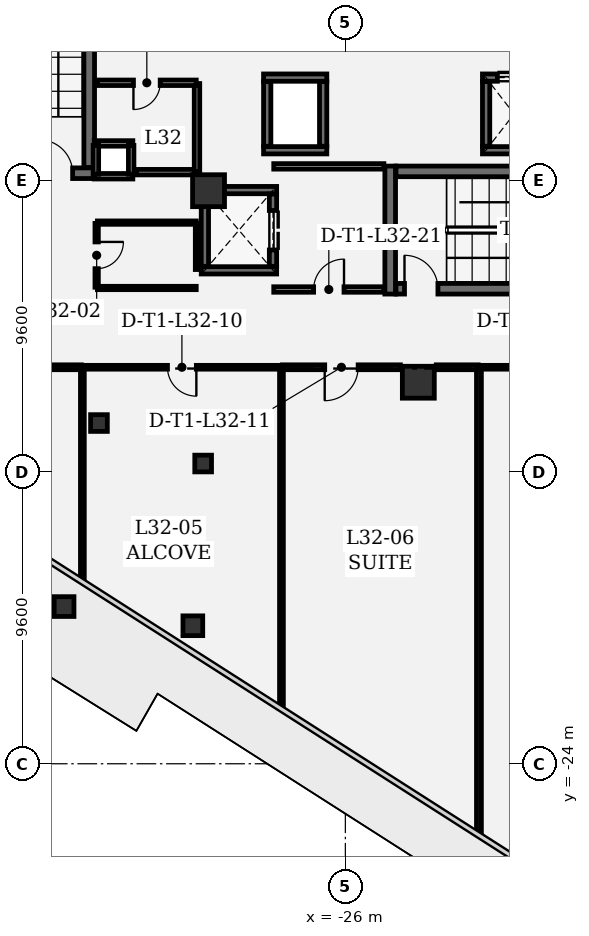
"""IFC4 building model, lengths in metres.
Left out: names, types, materials, properties, quantities, classifications, styles, units other than length and angle.
Written with IfcOpenShell. Run it as: python <this file> out.ifc"""

import sys

from ifc_helpers import new_model, si_unit, direction, frame, frame_2d, origin, origin_2d, place, context, subcontext, project, spatial, rectangle, extrude, element, fill, save


model = new_model("IFC4")
c1 = context("Model", 3, precision=1e-05, world=origin(), true_north=direction((0.0, 1.0)))
c2 = subcontext(c1, "Body", "Model", "MODEL_VIEW")
j1 = project(units=[si_unit("LENGTHUNIT", "METRE"), si_unit("PLANEANGLEUNIT", "RADIAN")], contexts=[c1])
p1 = place(None, origin())
s1 = spatial("IfcSite", under=j1, at=p1, CompositionType="ELEMENT")
p2 = place(p1, origin())
s2 = spatial("IfcBuilding", under=s1, at=p2, CompositionType="ELEMENT")
p3 = place(p2, frame((0.0, 0.0, 142.2)))
s3 = spatial("IfcBuildingStorey", under=s2, at=p3, CompositionType="ELEMENT", Elevation=142.2)
for number, where, z_axis, x_axis in (
    (1, (-23.6, -11.45, 0.0), (0.0, 0.0, 1.0), (1.0, 0.0, 0.0)),
    (2, (-30.5, -5.15, 0.0), (0.0, 0.0, 1.0), (1.0, 0.0, 0.0)),
):
    element("IfcColumn", number, at=place(p3, frame(where, z_axis=z_axis, x_axis=x_axis)), inside=s3, PredefinedType="COLUMN", context=c2, shape_type="SweptSolid", body=[
        extrude(rectangle(XDim=1.05, YDim=1.05, at=origin_2d()), origin(), (0.0, 0.0, 1.0), 4.05),
    ])
for number, where, z_axis, x_axis in (
    (3, (-35.252, -18.829, 0.0), (0.0, 0.0, 1.0), (1.0, 0.0, 0.0)),
    (4, (-31.016, -19.46, 0.0), (0.0, 0.0, 1.0), (1.0, 0.0, 0.0)),
):
    element("IfcColumn", number, at=place(p3, frame(where, z_axis=z_axis, x_axis=x_axis)), inside=s3, PredefinedType="COLUMN", context=c2, shape_type="SweptSolid", body=[
        extrude(rectangle(XDim=0.65, YDim=0.65, at=origin_2d()), origin(), (0.0, 0.0, 1.0), 4.05),
    ])
for number, where, z_axis, x_axis in (
    (5, (-34.104, -12.792, 0.0), (0.0, 0.0, 1.0), (1.0, 0.0, 0.0)),
    (6, (-30.677, -14.124, 0.0), (0.0, 0.0, 1.0), (1.0, 0.0, 0.0)),
):
    element("IfcColumn", number, at=place(p3, frame(where, z_axis=z_axis, x_axis=x_axis)), inside=s3, PredefinedType="COLUMN", context=c2, shape_type="SweptSolid", body=[
        extrude(rectangle(XDim=0.55, YDim=0.55, at=origin_2d()), origin(), (0.0, 0.0, 1.0), 4.05),
    ])
p4 = place(p3, frame((-24.525, -4.34, 0.0), z_axis=(0.0, 0.0, 1.0), x_axis=(0.0, -1.0, 0.0)))
e7 = element("IfcWall", 7, at=p4, inside=s3, PredefinedType="SHEAR", context=c2, shape_type="SweptSolid", body=[
    extrude(rectangle(XDim=4.21, YDim=0.35, at=frame_2d((2.105, 0.0))), origin(), (0.0, 0.0, 1.0), 3.78),
])
p5 = place(p3, frame((-24.335, -8.375, 0.0), z_axis=(0.0, 0.0, 1.0), x_axis=(1.0, 0.0, 0.0)))
e8 = element("IfcWall", 8, at=p5, inside=s3, PredefinedType="SHEAR", context=c2, shape_type="SweptSolid", body=[
    extrude(rectangle(XDim=8.12, YDim=0.35, at=frame_2d((4.06, 0.0))), origin(), (0.0, 0.0, 1.0), 3.78),
])
p6 = place(p5, frame((0.28, 0.0, 0.0)))
e9 = element("IfcOpeningElement", 9, at=p6, cuts=e8, PredefinedType="OPENING", context=c2, shape_type="SweptSolid", body=[
    extrude(rectangle(XDim=1.1, YDim=2.2, at=frame_2d((0.55, 1.1))), frame((0.0, 0.185, 0.0), z_axis=(0.0, -1.0, 0.0), x_axis=(1.0, 0.0, 0.0)), (0.0, 0.0, 1.0), 0.37),
])
p7 = place(p3, frame((-16.215, -4.515, 0.0), z_axis=(0.0, 0.0, 1.0), x_axis=(-1.0, 0.0, 0.0)))
e10 = element("IfcWall", 10, at=p7, inside=s3, PredefinedType="SHEAR", context=c2, shape_type="SweptSolid", body=[
    extrude(rectangle(XDim=8.12, YDim=0.35, at=frame_2d((4.06, 0.0))), origin(), (0.0, 0.0, 1.0), 3.78),
])
p8 = place(p3, frame((-38.46, -4.575, 0.0), z_axis=(0.0, 0.0, 1.0), x_axis=(1.0, 0.0, 0.0)))
e11 = element("IfcWall", 11, at=p8, inside=s3, PredefinedType="SHEAR", context=c2, shape_type="SweptSolid", body=[
    extrude(rectangle(XDim=4.21, YDim=0.35, at=frame_2d((2.105, 0.0))), origin(), (0.0, 0.0, 1.0), 3.78),
])
p9 = place(p8, frame((2.39, 0.0, 0.0)))
e12 = element("IfcOpeningElement", 12, at=p9, cuts=e11, PredefinedType="OPENING", context=c2, shape_type="SweptSolid", body=[
    extrude(rectangle(XDim=1.1, YDim=2.2, at=frame_2d((0.55, 1.1))), frame((0.0, 0.185, 0.0), z_axis=(0.0, -1.0, 0.0), x_axis=(1.0, 0.0, 0.0)), (0.0, 0.0, 1.0), 0.37),
])
p10 = place(p3, frame((-34.425, -4.385, 0.0), z_axis=(0.0, 0.0, 1.0), x_axis=(0.0, 1.0, 0.0)))
e13 = element("IfcWall", 13, at=p10, inside=s3, PredefinedType="SHEAR", context=c2, shape_type="SweptSolid", body=[
    extrude(rectangle(XDim=8.77, YDim=0.35, at=frame_2d((4.385, 0.0))), origin(), (0.0, 0.0, 1.0), 3.78),
])
for number, where, z_axis, x_axis in (
    (14, (-28.26, -7.77, 0.0), (0.0, 0.0, 1.0), (-1.0, 0.0, 0.0)),
    (15, (-30.74, -5.13, 0.0), (0.0, 0.0, 1.0), (1.0, 0.0, 0.0)),
):
    element("IfcWall", number, at=place(p3, frame(where, z_axis=z_axis, x_axis=x_axis)), inside=s3, PredefinedType="SHEAR", context=c2, shape_type="SweptSolid", body=[
        extrude(rectangle(XDim=2.48, YDim=0.24, at=frame_2d((1.24, 0.0))), origin(), (0.0, 0.0, 1.0), 3.78),
    ])
p11 = place(p3, frame((-30.62, -7.638, 0.0), z_axis=(0.0, 0.0, 1.0), x_axis=(0.0, 1.0, 0.0)))
e16 = element("IfcWall", 16, at=p11, inside=s3, PredefinedType="SHEAR", context=c2, shape_type="SweptSolid", body=[
    extrude(rectangle(XDim=2.376, YDim=0.24, at=frame_2d((1.188, 0.0))), origin(), (0.0, 0.0, 1.0), 3.78),
])
p12 = place(p3, frame((-28.38, -5.262, 0.0), z_axis=(0.0, 0.0, 1.0), x_axis=(0.0, -1.0, 0.0)))
e17 = element("IfcWall", 17, at=p12, inside=s3, PredefinedType="SHEAR", context=c2, shape_type="SweptSolid", body=[
    extrude(rectangle(XDim=2.376, YDim=0.24, at=frame_2d((1.188, 0.0))), origin(), (0.0, 0.0, 1.0), 3.78),
])
p13 = place(p12, frame((0.538, 0.0, 0.0)))
e18 = element("IfcOpeningElement", 18, at=p13, cuts=e17, PredefinedType="OPENING", context=c2, shape_type="SweptSolid", body=[
    extrude(rectangle(XDim=1.3, YDim=2.3, at=frame_2d((0.65, 1.15))), frame((0.0, 0.13, 0.0), z_axis=(0.0, -1.0, 0.0), x_axis=(1.0, 0.0, 0.0)), (0.0, 0.0, 1.0), 0.26),
])
for number, where, z_axis, x_axis in (
    (19, (-26.61, -3.82, 0.0), (0.0, 0.0, 1.0), (-1.0, 0.0, 0.0)),
    (20, (-28.69, -1.43, 0.0), (0.0, 0.0, 1.0), (1.0, 0.0, 0.0)),
):
    element("IfcWall", number, at=place(p3, frame(where, z_axis=z_axis, x_axis=x_axis)), inside=s3, PredefinedType="SHEAR", context=c2, shape_type="SweptSolid", body=[
        extrude(rectangle(XDim=2.08, YDim=0.24, at=frame_2d((1.04, 0.0))), origin(), (0.0, 0.0, 1.0), 3.78),
    ])
for number, where, z_axis, x_axis in (
    (21, (-28.57, -3.688, 0.0), (0.0, 0.0, 1.0), (0.0, 1.0, 0.0)),
    (22, (-26.73, -1.562, 0.0), (0.0, 0.0, 1.0), (0.0, -1.0, 0.0)),
):
    element("IfcWall", number, at=place(p3, frame(where, z_axis=z_axis, x_axis=x_axis)), inside=s3, PredefinedType="SHEAR", context=c2, shape_type="SweptSolid", body=[
        extrude(rectangle(XDim=2.126, YDim=0.24, at=frame_2d((1.063, 0.0))), origin(), (0.0, 0.0, 1.0), 3.78),
    ])
p14 = place(p3, frame((-19.41, -3.82, 0.0), z_axis=(0.0, 0.0, 1.0), x_axis=(-1.0, 0.0, 0.0)))
e23 = element("IfcWall", 23, at=p14, inside=s3, PredefinedType="SHEAR", context=c2, shape_type="SweptSolid", body=[
    extrude(rectangle(XDim=2.08, YDim=0.24, at=frame_2d((1.04, 0.0))), origin(), (0.0, 0.0, 1.0), 3.78),
])
p15 = place(p3, frame((-21.49, -1.43, 0.0), z_axis=(0.0, 0.0, 1.0), x_axis=(1.0, 0.0, 0.0)))
e24 = element("IfcWall", 24, at=p15, inside=s3, PredefinedType="SHEAR", context=c2, shape_type="SweptSolid", body=[
    extrude(rectangle(XDim=2.08, YDim=0.24, at=frame_2d((1.04, 0.0))), origin(), (0.0, 0.0, 1.0), 3.78),
])
p16 = place(p15, frame((0.49, 0.0, 0.0)))
e25 = element("IfcOpeningElement", 25, at=p16, cuts=e24, PredefinedType="OPENING", context=c2, shape_type="SweptSolid", body=[
    extrude(rectangle(XDim=1.1, YDim=2.2, at=frame_2d((0.55, 1.1))), frame((0.0, 0.13, 0.0), z_axis=(0.0, -1.0, 0.0), x_axis=(1.0, 0.0, 0.0)), (0.0, 0.0, 1.0), 0.26),
])
p17 = place(p3, frame((-21.37, -3.688, 0.0), z_axis=(0.0, 0.0, 1.0), x_axis=(0.0, 1.0, 0.0)))
e26 = element("IfcWall", 26, at=p17, inside=s3, PredefinedType="SHEAR", context=c2, shape_type="SweptSolid", body=[
    extrude(rectangle(XDim=2.126, YDim=0.24, at=frame_2d((1.063, 0.0))), origin(), (0.0, 0.0, 1.0), 3.78),
])
for number, where, z_axis, x_axis in (
    (27, (-32.99, -4.675, 0.0), (0.0, 0.0, 1.0), (-1.0, 0.0, 0.0)),
    (28, (-34.26, -3.595, 0.0), (0.0, 0.0, 1.0), (1.0, 0.0, 0.0)),
):
    element("IfcWall", number, at=place(p3, frame(where, z_axis=z_axis, x_axis=x_axis)), inside=s3, PredefinedType="PARTITIONING", context=c2, shape_type="SweptSolid", body=[
        extrude(rectangle(XDim=1.27, YDim=0.18, at=frame_2d((0.635, 0.0))), origin(), (0.0, 0.0, 1.0), 3.78),
    ])
for number, where, z_axis, x_axis in (
    (29, (-34.205, -4.61, 0.0), (0.0, 0.0, 1.0), (0.0, 1.0, 0.0)),
    (30, (-33.045, -3.66, 0.0), (0.0, 0.0, 1.0), (0.0, -1.0, 0.0)),
):
    element("IfcWall", number, at=place(p3, frame(where, z_axis=z_axis, x_axis=x_axis)), inside=s3, PredefinedType="PARTITIONING", context=c2, shape_type="SweptSolid", body=[
        extrude(rectangle(XDim=0.95, YDim=0.18, at=frame_2d((0.475, 0.0))), origin(), (0.0, 0.0, 1.0), 3.78),
    ])
p18 = place(p3, frame((-28.355, -8.4, 0.0), z_axis=(0.0, 0.0, 1.0), x_axis=(1.0, 0.0, 0.0)))
e31 = element("IfcWall", 31, at=p18, inside=s3, PredefinedType="PARTITIONING", context=c2, shape_type="SweptSolid", body=[
    extrude(rectangle(XDim=3.622, YDim=0.18, at=frame_2d((1.811, 0.0))), origin(), (0.0, 0.0, 1.0), 3.78),
])
p19 = place(p18, frame((1.311, 0.0, 0.0)))
e32 = element("IfcOpeningElement", 32, at=p19, cuts=e31, PredefinedType="OPENING", context=c2, shape_type="SweptSolid", body=[
    extrude(rectangle(XDim=1.0, YDim=2.15, at=frame_2d((0.5, 1.075))), frame((0.0, 0.1, 0.0), z_axis=(0.0, -1.0, 0.0), x_axis=(1.0, 0.0, 0.0)), (0.0, 0.0, 1.0), 0.2),
])
p20 = place(p3, frame((-24.733, -4.35, 0.0), z_axis=(0.0, 0.0, 1.0), x_axis=(-1.0, 0.0, 0.0)))
e33 = element("IfcWall", 33, at=p20, inside=s3, PredefinedType="PARTITIONING", context=c2, shape_type="SweptSolid", body=[
    extrude(rectangle(XDim=3.622, YDim=0.18, at=frame_2d((1.811, 0.0))), origin(), (0.0, 0.0, 1.0), 3.78),
])
p21 = place(p3, frame((-34.18, -6.225, 0.0), z_axis=(0.0, 0.0, 1.0), x_axis=(0.0, -1.0, 0.0)))
e34 = element("IfcWall", 34, at=p21, inside=s3, PredefinedType="PARTITIONING", context=c2, shape_type="SweptSolid", body=[
    extrude(rectangle(XDim=2.1, YDim=0.11, at=frame_2d((1.05, 0.0))), origin(), (0.0, 0.0, 1.0), 3.78),
])
p22 = place(p21, frame((0.61, 0.0, 0.0)))
e35 = element("IfcOpeningElement", 35, at=p22, cuts=e34, PredefinedType="OPENING", context=c2, shape_type="SweptSolid", body=[
    extrude(rectangle(XDim=0.88, YDim=2.1, at=frame_2d((0.44, 1.05))), frame((0.0, 0.065, 0.0), z_axis=(0.0, -1.0, 0.0), x_axis=(1.0, 0.0, 0.0)), (0.0, 0.0, 1.0), 0.13),
])
p23 = place(p3, frame((-34.155, -8.35, 0.0), z_axis=(0.0, 0.0, 1.0), x_axis=(1.0, 0.0, 0.0)))
e36 = element("IfcWall", 36, at=p23, inside=s3, PredefinedType="PARTITIONING", context=c2, shape_type="SweptSolid", body=[
    extrude(rectangle(XDim=3.25, YDim=0.11, at=frame_2d((1.625, 0.0))), origin(), (0.0, 0.0, 1.0), 3.78),
])
p24 = place(p3, frame((-30.88, -7.743, 0.0), z_axis=(0.0, 0.0, 1.0), x_axis=(0.0, 1.0, 0.0)))
e37 = element("IfcWall", 37, at=p24, inside=s3, PredefinedType="PARTITIONING", context=c2, shape_type="SweptSolid", body=[
    extrude(rectangle(XDim=1.518, YDim=0.11, at=frame_2d((0.759, 0.0))), origin(), (0.0, 0.0, 1.0), 3.78),
])
p25 = place(p3, frame((-30.905, -6.2, 0.0), z_axis=(0.0, 0.0, 1.0), x_axis=(-1.0, 0.0, 0.0)))
e38 = element("IfcWall", 38, at=p25, inside=s3, PredefinedType="PARTITIONING", context=c2, shape_type="SweptSolid", body=[
    extrude(rectangle(XDim=3.25, YDim=0.11, at=frame_2d((1.625, 0.0))), origin(), (0.0, 0.0, 1.0), 3.344),
])
p26 = place(p3, frame((-32.88, -4.54, 0.0), z_axis=(0.0, 0.0, 1.0), x_axis=(1.0, 0.0, 0.0)))
e39 = element("IfcWall", 39, at=p26, inside=s3, PredefinedType="PARTITIONING", context=c2, shape_type="SweptSolid", body=[
    extrude(rectangle(XDim=1.975, YDim=0.18, at=frame_2d((0.988, 0.0))), origin(), (0.0, 0.0, 1.0), 3.78),
])
p27 = place(p3, frame((-30.88, -4.515, 0.0), z_axis=(0.0, 0.0, 1.0), x_axis=(0.0, 1.0, 0.0)))
e40 = element("IfcWall", 40, at=p27, inside=s3, PredefinedType="PARTITIONING", context=c2, shape_type="SweptSolid", body=[
    extrude(rectangle(XDim=2.89, YDim=0.18, at=frame_2d((1.445, 0.0))), origin(), (0.0, 0.0, 1.0), 3.78),
])
p28 = place(p3, frame((-30.905, -1.6, 0.0), z_axis=(0.0, 0.0, 1.0), x_axis=(-1.0, 0.0, 0.0)))
e41 = element("IfcWall", 41, at=p28, inside=s3, PredefinedType="PARTITIONING", context=c2, shape_type="SweptSolid", body=[
    extrude(rectangle(XDim=3.25, YDim=0.18, at=frame_2d((1.625, 0.0))), origin(), (0.0, 0.0, 1.0), 3.78),
])
p29 = place(p28, frame((1.185, 0.0, 0.0)))
e42 = element("IfcOpeningElement", 42, at=p29, cuts=e41, PredefinedType="OPENING", context=c2, shape_type="SweptSolid", body=[
    extrude(rectangle(XDim=0.88, YDim=2.1, at=frame_2d((0.44, 1.05))), frame((0.0, 0.1, 0.0), z_axis=(0.0, -1.0, 0.0), x_axis=(1.0, 0.0, 0.0)), (0.0, 0.0, 1.0), 0.2),
])
p30 = place(p3, frame((-28.127, -10.958, 0.0), z_axis=(0.0, 0.0, 1.0), x_axis=(-1.0, 0.0, 0.0)))
e43 = element("IfcWall", 43, at=p30, inside=s3, PredefinedType="PARTITIONING", context=c2, shape_type="SweptSolid", body=[
    extrude(rectangle(XDim=6.498, YDim=0.125, at=frame_2d((3.249, 0.0))), origin(), (0.0, 0.0, 1.0), 3.78),
])
p31 = place(p30, frame((2.774, 0.0, 0.0)))
e44 = element("IfcOpeningElement", 44, at=p31, cuts=e43, PredefinedType="OPENING", context=c2, shape_type="SweptSolid", body=[
    extrude(rectangle(XDim=0.95, YDim=2.15, at=frame_2d((0.475, 1.075))), frame((0.0, 0.073, 0.0), z_axis=(0.0, -1.0, 0.0), x_axis=(1.0, 0.0, 0.0)), (0.0, 0.0, 1.0), 0.145),
])
p32 = place(p3, frame((-34.65, -10.983, 0.0), z_axis=(0.0, 0.0, 1.0), x_axis=(0.0, -1.0, 0.0)))
e45 = element("IfcWall", 45, at=p32, inside=s3, PredefinedType="PARTITIONING", context=c2, shape_type="SweptSolid", body=[
    extrude(rectangle(XDim=6.952, YDim=0.125, at=frame_2d((3.476, 0.0))), origin(), (0.0, 0.0, 1.0), 3.78),
])
p33 = place(p3, frame((-28.102, -22.12, 0.0), z_axis=(0.0, 0.0, 1.0), x_axis=(0.0, 1.0, 0.0)))
e46 = element("IfcWall", 46, at=p33, inside=s3, PredefinedType="PARTITIONING", context=c2, shape_type="SweptSolid", body=[
    extrude(rectangle(XDim=11.137, YDim=0.125, at=frame_2d((5.568, 0.0))), origin(), (0.0, 0.0, 1.0), 3.344),
])
p34 = place(p3, frame((-24.19, -10.958, 0.0), z_axis=(0.0, 0.0, 1.0), x_axis=(-1.0, 0.0, 0.0)))
e47 = element("IfcWall", 47, at=p34, inside=s3, PredefinedType="PARTITIONING", context=c2, shape_type="SweptSolid", body=[
    extrude(rectangle(XDim=3.879, YDim=0.16, at=frame_2d((1.939, 0.0))), origin(), (0.0, 0.0, 1.0), 3.78),
])
p35 = place(p34, frame((1.389, 0.0, 0.0)))
e48 = element("IfcOpeningElement", 48, at=p35, cuts=e47, PredefinedType="OPENING", context=c2, shape_type="SweptSolid", body=[
    extrude(rectangle(XDim=1.1, YDim=2.15, at=frame_2d((0.55, 1.075))), frame((0.0, 0.09, 0.0), z_axis=(0.0, -1.0, 0.0), x_axis=(1.0, 0.0, 0.0)), (0.0, 0.0, 1.0), 0.18),
])
p36 = place(p3, frame((-21.606, -26.271, 0.0), z_axis=(0.0, 0.0, 1.0), x_axis=(0.0, 1.0, 0.0)))
e49 = element("IfcWall", 49, at=p36, inside=s3, PredefinedType="PARTITIONING", context=c2, shape_type="SweptSolid", body=[
    extrude(rectangle(XDim=15.288, YDim=0.16, at=frame_2d((7.644, 0.0))), origin(), (0.0, 0.0, 1.0), 2.895),
])
p37 = place(p3, frame((-21.631, -10.958, 0.0), z_axis=(0.0, 0.0, 1.0), x_axis=(-1.0, 0.0, 0.0)))
e50 = element("IfcWall", 50, at=p37, inside=s3, PredefinedType="PARTITIONING", context=c2, shape_type="SweptSolid", body=[
    extrude(rectangle(XDim=1.379, YDim=0.16, at=frame_2d((0.689, 0.0))), origin(), (0.0, 0.0, 1.0), 3.78),
])
p38 = place(p3, frame((-17.79, -10.958, 0.0), z_axis=(0.0, 0.0, 1.0), x_axis=(-1.0, 0.0, 0.0)))
e51 = element("IfcWall", 51, at=p38, inside=s3, PredefinedType="PARTITIONING", context=c2, shape_type="SweptSolid", body=[
    extrude(rectangle(XDim=3.783, YDim=0.125, at=frame_2d((1.892, 0.0))), origin(), (0.0, 0.0, 1.0), 3.78),
])
p39 = place(p38, frame((1.417, 0.0, 0.0)))
e52 = element("IfcOpeningElement", 52, at=p39, cuts=e51, PredefinedType="OPENING", context=c2, shape_type="SweptSolid", body=[
    extrude(rectangle(XDim=0.95, YDim=2.15, at=frame_2d((0.475, 1.075))), frame((0.0, 0.073, 0.0), z_axis=(0.0, -1.0, 0.0), x_axis=(1.0, 0.0, 0.0)), (0.0, 0.0, 1.0), 0.145),
])
p40 = place(p3, frame((-34.683, -10.958, 0.0), z_axis=(0.0, 0.0, 1.0), x_axis=(-1.0, 0.0, 0.0)))
e53 = element("IfcWall", 53, at=p40, inside=s3, PredefinedType="PARTITIONING", context=c2, shape_type="SweptSolid", body=[
    extrude(rectangle(XDim=3.15, YDim=0.16, at=frame_2d((1.575, 0.0))), origin(), (0.0, 0.0, 1.0), 3.344),
])
p41 = place(p40, frame((1.025, 0.0, 0.0)))
e54 = element("IfcOpeningElement", 54, at=p41, cuts=e53, PredefinedType="OPENING", context=c2, shape_type="SweptSolid", body=[
    extrude(rectangle(XDim=1.1, YDim=2.15, at=frame_2d((0.55, 1.075))), frame((0.0, 0.09, 0.0), z_axis=(0.0, -1.0, 0.0), x_axis=(1.0, 0.0, 0.0)), (0.0, 0.0, 1.0), 0.18),
])
p42 = place(p6, origin())
e55 = element("IfcDoor", 55, at=p42, inside=s3, OperationType="SINGLE_SWING_LEFT", PredefinedType="DOOR", context=c2, shape_type="SweptSolid", body=[
    extrude(rectangle(XDim=1.1, YDim=2.2, at=frame_2d((0.55, 1.1))), frame((0.0, 0.025, 0.0), z_axis=(0.0, -1.0, 0.0), x_axis=(1.0, 0.0, 0.0)), (0.0, 0.0, 1.0), 0.05),
])
fill(e9, e55)
p43 = place(p9, origin())
e56 = element("IfcDoor", 56, at=p43, inside=s3, OperationType="SINGLE_SWING_LEFT", PredefinedType="DOOR", context=c2, shape_type="SweptSolid", body=[
    extrude(rectangle(XDim=1.1, YDim=2.2, at=frame_2d((0.55, 1.1))), frame((0.0, 0.025, 0.0), z_axis=(0.0, -1.0, 0.0), x_axis=(1.0, 0.0, 0.0)), (0.0, 0.0, 1.0), 0.05),
])
fill(e12, e56)
p44 = place(p13, origin())
e57 = element("IfcDoor", 57, at=p44, inside=s3, OperationType="DOUBLE_DOOR_SLIDING", PredefinedType="DOOR", context=c2, shape_type="SweptSolid", body=[
    extrude(rectangle(XDim=1.3, YDim=2.3, at=frame_2d((0.65, 1.15))), frame((0.0, 0.025, 0.0), z_axis=(0.0, -1.0, 0.0), x_axis=(1.0, 0.0, 0.0)), (0.0, 0.0, 1.0), 0.05),
])
fill(e18, e57)
p45 = place(p16, origin())
e58 = element("IfcDoor", 58, at=p45, inside=s3, OperationType="DOUBLE_DOOR_SLIDING", PredefinedType="DOOR", context=c2, shape_type="SweptSolid", body=[
    extrude(rectangle(XDim=1.1, YDim=2.2, at=frame_2d((0.55, 1.1))), frame((0.0, 0.025, 0.0), z_axis=(0.0, -1.0, 0.0), x_axis=(1.0, 0.0, 0.0)), (0.0, 0.0, 1.0), 0.05),
])
fill(e25, e58)
p46 = place(p22, origin())
e59 = element("IfcDoor", 59, at=p46, inside=s3, OperationType="SINGLE_SWING_LEFT", PredefinedType="DOOR", context=c2, shape_type="SweptSolid", body=[
    extrude(rectangle(XDim=0.88, YDim=2.1, at=frame_2d((0.44, 1.05))), frame((0.0, 0.025, 0.0), z_axis=(0.0, -1.0, 0.0), x_axis=(1.0, 0.0, 0.0)), (0.0, 0.0, 1.0), 0.05),
])
fill(e35, e59)
p47 = place(p29, origin())
e60 = element("IfcDoor", 60, at=p47, inside=s3, OperationType="SINGLE_SWING_RIGHT", PredefinedType="DOOR", context=c2, shape_type="SweptSolid", body=[
    extrude(rectangle(XDim=0.88, YDim=2.1, at=frame_2d((0.44, 1.05))), frame((0.0, 0.025, 0.0), z_axis=(0.0, -1.0, 0.0), x_axis=(1.0, 0.0, 0.0)), (0.0, 0.0, 1.0), 0.05),
])
fill(e42, e60)
p48 = place(p31, origin())
e61 = element("IfcDoor", 61, at=p48, inside=s3, OperationType="SINGLE_SWING_LEFT", PredefinedType="DOOR", context=c2, shape_type="SweptSolid", body=[
    extrude(rectangle(XDim=0.95, YDim=2.15, at=frame_2d((0.475, 1.075))), frame((0.0, 0.025, 0.0), z_axis=(0.0, -1.0, 0.0), x_axis=(1.0, 0.0, 0.0)), (0.0, 0.0, 1.0), 0.05),
])
fill(e44, e61)
p49 = place(p35, origin())
e62 = element("IfcDoor", 62, at=p49, inside=s3, OperationType="SINGLE_SWING_RIGHT", PredefinedType="DOOR", context=c2, shape_type="SweptSolid", body=[
    extrude(rectangle(XDim=1.1, YDim=2.15, at=frame_2d((0.55, 1.075))), frame((0.0, 0.025, 0.0), z_axis=(0.0, -1.0, 0.0), x_axis=(1.0, 0.0, 0.0)), (0.0, 0.0, 1.0), 0.05),
])
fill(e48, e62)
p50 = place(p19, origin())
e63 = element("IfcDoor", 63, at=p50, inside=s3, OperationType="SINGLE_SWING_RIGHT", PredefinedType="DOOR", context=c2, shape_type="SweptSolid", body=[
    extrude(rectangle(XDim=1.0, YDim=2.15, at=frame_2d((0.5, 1.075))), frame((0.0, 0.025, 0.0), z_axis=(0.0, -1.0, 0.0), x_axis=(1.0, 0.0, 0.0)), (0.0, 0.0, 1.0), 0.05),
])
fill(e32, e63)
save(model, sys.argv[1])
